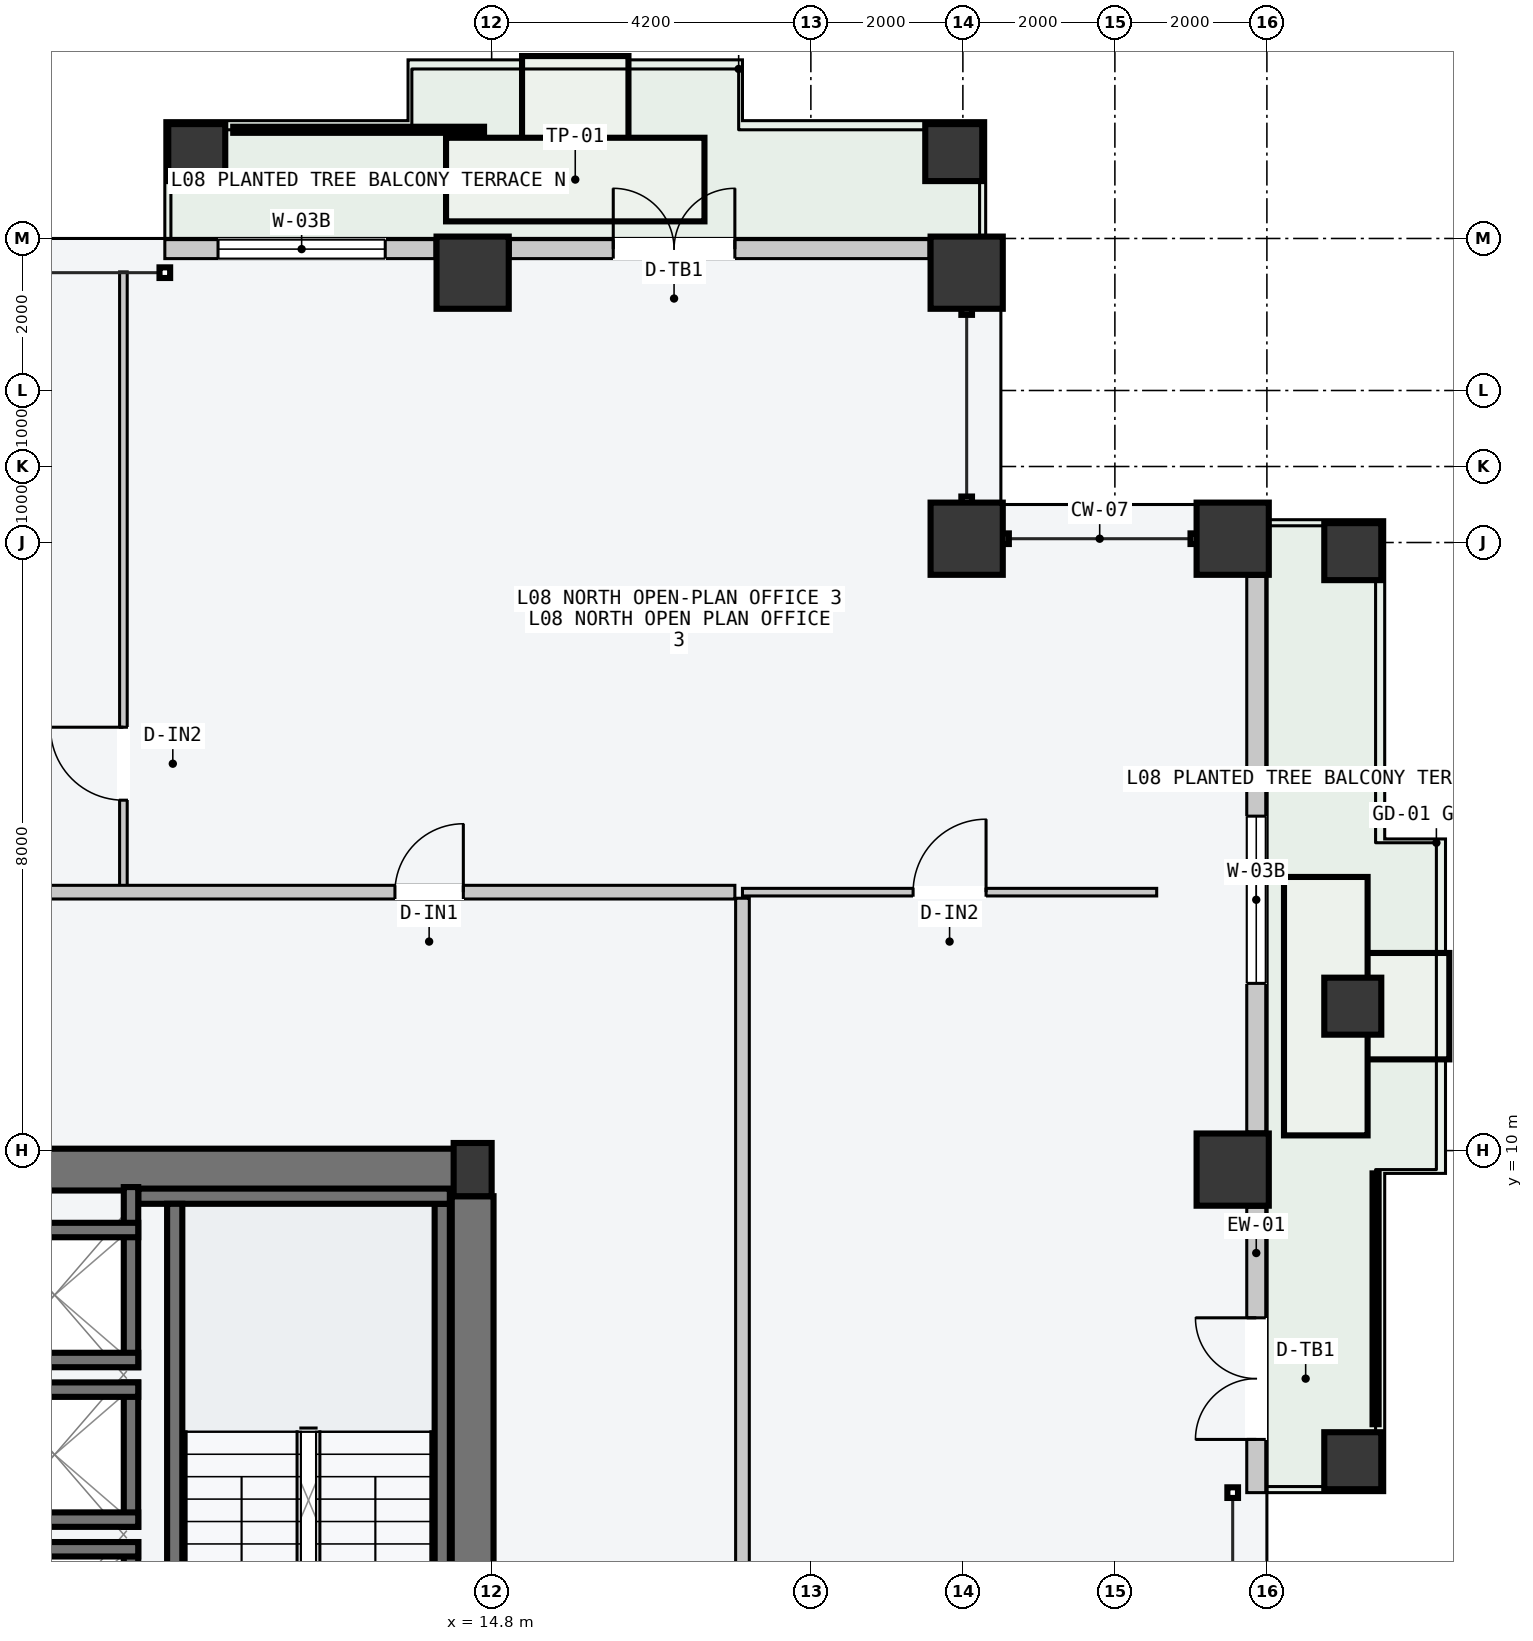
"""IFC4 building model, lengths in metres.
Left out: names, types, materials, properties, quantities, classifications, styles, units other than length and angle.
Written with IfcOpenShell. Run it as: python <this file> out.ifc"""

import sys

from ifc_helpers import new_model, si_unit, direction, frame, frame_2d, origin, origin_2d, place, context, subcontext, project, spatial, rectangle, hollow_rectangle, i_section, extrude, element, fill, save


model = new_model("IFC4")
c1 = context("Model", 3, precision=1e-05, world=origin(), true_north=direction((0.0, 1.0)))
c2 = subcontext(c1, "Body", "Model", "MODEL_VIEW")
j1 = project(units=[si_unit("LENGTHUNIT", "METRE"), si_unit("PLANEANGLEUNIT", "RADIAN")], contexts=[c1])
p1 = place(None, origin())
s1 = spatial("IfcSite", under=j1, at=p1, CompositionType="ELEMENT")
p2 = place(p1, origin())
s2 = spatial("IfcBuilding", under=s1, at=p2, CompositionType="ELEMENT")
p3 = place(p2, frame((0.0, 0.0, 34.8)))
s3 = spatial("IfcBuildingStorey", under=s2, at=p3, CompositionType="ELEMENT", Elevation=34.8)
p4 = place(p3, frame((8.07, 9.75, -0.2), z_axis=(0.0, 0.0, 1.0), x_axis=(1.0, 0.0, 0.0)))
e1 = element("IfcWall", 1, at=p4, inside=s3, PredefinedType="SHEAR", context=c2, shape_type="SweptSolid", body=[
    extrude(rectangle(XDim=6.46, YDim=0.55, at=frame_2d((3.23, 0.0))), origin(), (0.0, 0.0, 1.0), 3.6),
])
p5 = place(p3, frame((14.55, 0.35, -0.2), z_axis=(0.0, 0.0, 1.0), x_axis=(0.0, 1.0, 0.0)))
e2 = element("IfcWall", 2, at=p5, inside=s3, PredefinedType="SHEAR", context=c2, shape_type="SweptSolid", body=[
    extrude(rectangle(XDim=9.05, YDim=0.55, at=frame_2d((4.525, 0.0))), origin(), (0.0, 0.0, 1.0), 3.6),
])
p6 = place(p3, frame((14.15, 1.5, -0.2), z_axis=(0.0, 0.0, 1.0), x_axis=(0.0, 1.0, 0.0)))
e3 = element("IfcWall", 3, at=p6, inside=s3, PredefinedType="SOLIDWALL", context=c2, shape_type="SweptSolid", body=[
    extrude(rectangle(XDim=7.8, YDim=0.2, at=frame_2d((3.9, 0.0))), origin(), (0.0, 0.0, 1.0), 3.6),
])
p7 = place(p3, frame((10.15, 9.4, -0.2), z_axis=(0.0, 0.0, 1.0), x_axis=(1.0, 0.0, 0.0)))
e4 = element("IfcWall", 4, at=p7, inside=s3, PredefinedType="SOLIDWALL", context=c2, shape_type="SweptSolid", body=[
    extrude(rectangle(XDim=4.1, YDim=0.2, at=frame_2d((2.05, 0.0))), origin(), (0.0, 0.0, 1.0), 3.6),
])
p8 = place(p3, frame((10.63, 1.5, -0.2), z_axis=(0.0, 0.0, 1.0), x_axis=(0.0, 1.0, 0.0)))
e5 = element("IfcWall", 5, at=p8, inside=s3, PredefinedType="SOLIDWALL", context=c2, shape_type="SweptSolid", body=[
    extrude(rectangle(XDim=7.8, YDim=0.2, at=frame_2d((3.9, 0.0))), origin(), (0.0, 0.0, 1.0), 3.6),
])
p9 = place(p3, frame((14.55, 9.75, 0.0), z_axis=(0.0, 0.0, 1.0), x_axis=(1.0, 0.0, 0.0)))
e6 = element("IfcColumn", 6, at=p9, inside=s3, PredefinedType="COLUMN", context=c2, shape_type="SweptSolid", body=[
    extrude(i_section(OverallWidth=0.5, OverallDepth=0.7, WebThickness=0.028, FlangeThickness=0.045, at=origin_2d()), origin(), (0.0, 0.0, 1.0), 3.6),
])
for number, where, z_axis, x_axis in (
    (7, (14.55, 21.55, 0.0), (0.0, 0.0, 1.0), (1.0, 0.0, 0.0)),
    (8, (21.05, 21.55, 0.0), (0.0, 0.0, 1.0), (1.0, 0.0, 0.0)),
    (9, (24.55, 9.75, 0.0), (0.0, 0.0, 1.0), (0.0, 1.0, 0.0)),
    (10, (24.55, 18.05, 0.0), (0.0, 0.0, 1.0), (0.0, 1.0, 0.0)),
    (11, (21.05, 18.05, 0.0), (0.0, 0.0, 1.0), (1.0, 0.0, 0.0)),
):
    element("IfcColumn", number, at=place(p3, frame(where, z_axis=z_axis, x_axis=x_axis)), inside=s3, PredefinedType="COLUMN", context=c2, shape_type="SweptSolid", body=[
        extrude(hollow_rectangle(XDim=0.95, YDim=0.95, WallThickness=0.048, at=origin_2d()), origin(), (0.0, 0.0, 1.0), 3.6),
    ])
for number, where, z_axis, x_axis in (
    (12, (10.92, 23.13, 0.0), (0.0, 0.0, 1.0), (1.0, 0.0, 0.0)),
    (13, (20.88, 23.13, 0.0), (0.0, 0.0, 1.0), (1.0, 0.0, 0.0)),
    (14, (26.13, 5.92, 0.0), (0.0, 0.0, 1.0), (0.0, 1.0, 0.0)),
    (15, (26.13, 17.88, 0.0), (0.0, 0.0, 1.0), (0.0, 1.0, 0.0)),
    (16, (26.13, 11.9, 0.0), (0.0, 0.0, 1.0), (0.0, 1.0, 0.0)),
):
    element("IfcColumn", number, at=place(p3, frame(where, z_axis=z_axis, x_axis=x_axis)), inside=s3, PredefinedType="COLUMN", context=c2, shape_type="SweptSolid", body=[
        extrude(hollow_rectangle(XDim=0.75, YDim=0.75, WallThickness=0.032, at=origin_2d()), origin(), (0.0, 0.0, 1.0), 3.6),
    ])
p10 = place(p3, frame((10.5, 21.86, 0.0), z_axis=(0.0, 0.0, 1.0), x_axis=(1.0, 0.0, 0.0)))
e17 = element("IfcWall", 17, at=p10, inside=s3, PredefinedType="STANDARD", context=c2, shape_type="SweptSolid", body=[
    extrude(rectangle(XDim=3.555, YDim=0.25, at=frame_2d((1.777, 0.0))), origin(), (0.0, 0.0, 1.0), 3.4),
])
p11 = place(p10, frame((0.7, 0.0, 0.85)))
e18 = element("IfcOpeningElement", 18, at=p11, cuts=e17, PredefinedType="OPENING", context=c2, shape_type="SweptSolid", body=[
    extrude(rectangle(XDim=2.2, YDim=2.1, at=frame_2d((1.1, 1.05))), frame((0.0, 0.135, 0.0), z_axis=(0.0, -1.0, 0.0), x_axis=(1.0, 0.0, 0.0)), (0.0, 0.0, 1.0), 0.27),
])
p12 = place(p3, frame((15.045, 21.86, 0.0), z_axis=(0.0, 0.0, 1.0), x_axis=(1.0, 0.0, 0.0)))
e19 = element("IfcWall", 19, at=p12, inside=s3, PredefinedType="STANDARD", context=c2, shape_type="SweptSolid", body=[
    extrude(rectangle(XDim=5.51, YDim=0.25, at=frame_2d((2.755, 0.0))), origin(), (0.0, 0.0, 1.0), 3.4),
])
p13 = place(p12, frame((1.355, 0.0, 0.0)))
e20 = element("IfcOpeningElement", 20, at=p13, cuts=e19, PredefinedType="OPENING", context=c2, shape_type="SweptSolid", body=[
    extrude(rectangle(XDim=1.6, YDim=2.2, at=frame_2d((0.8, 1.1))), frame((0.0, 0.135, 0.0), z_axis=(0.0, -1.0, 0.0), x_axis=(1.0, 0.0, 0.0)), (0.0, 0.0, 1.0), 0.27),
])
p14 = place(p3, frame((24.86, 5.5, 0.0), z_axis=(0.0, 0.0, 1.0), x_axis=(0.0, 1.0, 0.0)))
e21 = element("IfcWall", 21, at=p14, inside=s3, PredefinedType="STANDARD", context=c2, shape_type="SweptSolid", body=[
    extrude(rectangle(XDim=3.755, YDim=0.25, at=frame_2d((1.877, 0.0))), origin(), (0.0, 0.0, 1.0), 3.4),
])
p15 = place(p14, frame((0.7, 0.0, 0.0)))
e22 = element("IfcOpeningElement", 22, at=p15, cuts=e21, PredefinedType="OPENING", context=c2, shape_type="SweptSolid", body=[
    extrude(rectangle(XDim=1.6, YDim=2.2, at=frame_2d((0.8, 1.1))), frame((0.0, 0.135, 0.0), z_axis=(0.0, -1.0, 0.0), x_axis=(1.0, 0.0, 0.0)), (0.0, 0.0, 1.0), 0.27),
])
p16 = place(p3, frame((24.86, 10.245, 0.0), z_axis=(0.0, 0.0, 1.0), x_axis=(0.0, 1.0, 0.0)))
e23 = element("IfcWall", 23, at=p16, inside=s3, PredefinedType="STANDARD", context=c2, shape_type="SweptSolid", body=[
    extrude(rectangle(XDim=7.31, YDim=0.25, at=frame_2d((3.655, 0.0))), origin(), (0.0, 0.0, 1.0), 3.4),
])
p17 = place(p16, frame((1.955, 0.0, 0.85)))
e24 = element("IfcOpeningElement", 24, at=p17, cuts=e23, PredefinedType="OPENING", context=c2, shape_type="SweptSolid", body=[
    extrude(rectangle(XDim=2.2, YDim=2.1, at=frame_2d((1.1, 1.05))), frame((0.0, 0.135, 0.0), z_axis=(0.0, -1.0, 0.0), x_axis=(1.0, 0.0, 0.0)), (0.0, 0.0, 1.0), 0.27),
])
p18 = place(p3, frame((10.055, 2.95, -0.2), z_axis=(0.0, 0.0, 1.0), x_axis=(0.0, 1.0, 0.0)))
e25 = element("IfcWall", 25, at=p18, inside=s3, PredefinedType="SOLIDWALL", context=c2, shape_type="SweptSolid", body=[
    extrude(rectangle(XDim=1.9, YDim=0.19, at=frame_2d((0.95, 0.0))), origin(), (0.0, 0.0, 1.0), 3.6),
])
p19 = place(p3, frame((7.95, 4.755, -0.2), z_axis=(0.0, 0.0, 1.0), x_axis=(1.0, 0.0, 0.0)))
e26 = element("IfcWall", 26, at=p19, inside=s3, PredefinedType="SOLIDWALL", context=c2, shape_type="SweptSolid", body=[
    extrude(rectangle(XDim=2.2, YDim=0.19, at=frame_2d((1.1, 0.0))), origin(), (0.0, 0.0, 1.0), 3.6),
])
p20 = place(p3, frame((10.055, 5.05, -0.2), z_axis=(0.0, 0.0, 1.0), x_axis=(0.0, 1.0, 0.0)))
e27 = element("IfcWall", 27, at=p20, inside=s3, PredefinedType="SOLIDWALL", context=c2, shape_type="SweptSolid", body=[
    extrude(rectangle(XDim=1.9, YDim=0.19, at=frame_2d((0.95, 0.0))), origin(), (0.0, 0.0, 1.0), 3.6),
])
for number, where, z_axis, x_axis in (
    (28, (7.95, 6.855, -0.2), (0.0, 0.0, 1.0), (1.0, 0.0, 0.0)),
    (29, (7.95, 5.145, -0.2), (0.0, 0.0, 1.0), (1.0, 0.0, 0.0)),
):
    element("IfcWall", number, at=place(p3, frame(where, z_axis=z_axis, x_axis=x_axis)), inside=s3, PredefinedType="SOLIDWALL", context=c2, shape_type="SweptSolid", body=[
        extrude(rectangle(XDim=2.2, YDim=0.19, at=frame_2d((1.1, 0.0))), origin(), (0.0, 0.0, 1.0), 3.6),
    ])
p21 = place(p3, frame((10.055, 7.15, -0.2), z_axis=(0.0, 0.0, 1.0), x_axis=(0.0, 1.0, 0.0)))
e30 = element("IfcWall", 30, at=p21, inside=s3, PredefinedType="SOLIDWALL", context=c2, shape_type="SweptSolid", body=[
    extrude(rectangle(XDim=2.37, YDim=0.19, at=frame_2d((1.185, 0.0))), origin(), (0.0, 0.0, 1.0), 3.6),
])
for number, where, z_axis, x_axis in (
    (31, (7.95, 8.955, -0.2), (0.0, 0.0, 1.0), (1.0, 0.0, 0.0)),
    (32, (7.95, 7.245, -0.2), (0.0, 0.0, 1.0), (1.0, 0.0, 0.0)),
):
    element("IfcWall", number, at=place(p3, frame(where, z_axis=z_axis, x_axis=x_axis)), inside=s3, PredefinedType="SOLIDWALL", context=c2, shape_type="SweptSolid", body=[
        extrude(rectangle(XDim=2.2, YDim=0.19, at=frame_2d((1.1, 0.0))), origin(), (0.0, 0.0, 1.0), 3.6),
    ])
p22 = place(p3, frame((9.955, 13.46, 0.0), z_axis=(0.0, 0.0, 1.0), x_axis=(0.0, 1.0, 0.0)))
e33 = element("IfcWall", 33, at=p22, inside=s3, PredefinedType="PARTITIONING", context=c2, shape_type="SweptSolid", body=[
    extrude(rectangle(XDim=8.1, YDim=0.1, at=frame_2d((4.05, 0.0))), origin(), (0.0, 0.0, 1.0), 3.4),
])
p23 = place(p22, frame((1.15, 0.0, 0.0)))
e34 = element("IfcOpeningElement", 34, at=p23, cuts=e33, PredefinedType="OPENING", context=c2, shape_type="SweptSolid", body=[
    extrude(rectangle(XDim=0.96, YDim=2.18, at=frame_2d((0.48, 1.09))), frame((0.0, 0.06, 0.0), z_axis=(0.0, -1.0, 0.0), x_axis=(1.0, 0.0, 0.0)), (0.0, 0.0, 1.0), 0.12),
])
p24 = place(p3, frame((-18.0, 13.4, 0.0), z_axis=(0.0, 0.0, 1.0), x_axis=(1.0, 0.0, 0.0)))
e35 = element("IfcWall", 35, at=p24, inside=s3, PredefinedType="PARTITIONING", context=c2, shape_type="SweptSolid", body=[
    extrude(rectangle(XDim=36.0, YDim=0.18, at=frame_2d((18.0, 0.0))), origin(), (0.0, 0.0, 1.0), 3.4),
])
p25 = place(p24, frame((7.185, 0.0, 0.0)))
e36 = element("IfcOpeningElement", 36, at=p25, cuts=e35, PredefinedType="OPENING", context=c2, shape_type="SweptSolid", body=[
    extrude(rectangle(XDim=1.24, YDim=2.24, at=frame_2d((0.62, 1.12))), frame((0.0, 0.1, 0.0), z_axis=(0.0, -1.0, 0.0), x_axis=(1.0, 0.0, 0.0)), (0.0, 0.0, 1.0), 0.2),
])
p26 = place(p24, frame((21.083, 0.0, 0.0)))
e37 = element("IfcOpeningElement", 37, at=p26, cuts=e35, PredefinedType="OPENING", context=c2, shape_type="SweptSolid", body=[
    extrude(rectangle(XDim=1.4, YDim=2.2, at=frame_2d((0.7, 1.1))), frame((0.0, 0.1, 0.0), z_axis=(0.0, -1.0, 0.0), x_axis=(1.0, 0.0, 0.0)), (0.0, 0.0, 1.0), 0.2),
])
p27 = place(p24, frame((31.528, 0.0, 0.0)))
e38 = element("IfcOpeningElement", 38, at=p27, cuts=e35, PredefinedType="OPENING", context=c2, shape_type="SweptSolid", body=[
    extrude(rectangle(XDim=0.9, YDim=2.15, at=frame_2d((0.45, 1.075))), frame((0.0, 0.1, 0.0), z_axis=(0.0, -1.0, 0.0), x_axis=(1.0, 0.0, 0.0)), (0.0, 0.0, 1.0), 0.2),
])
p28 = place(p3, frame((18.1, 13.4, 0.0), z_axis=(0.0, 0.0, 1.0), x_axis=(1.0, 0.0, 0.0)))
e39 = element("IfcWall", 39, at=p28, inside=s3, PredefinedType="PARTITIONING", context=c2, shape_type="SweptSolid", body=[
    extrude(rectangle(XDim=5.45, YDim=0.1, at=frame_2d((2.725, 0.0))), origin(), (0.0, 0.0, 1.0), 3.4),
])
p29 = place(p28, frame((2.245, 0.0, 0.0)))
e40 = element("IfcOpeningElement", 40, at=p29, cuts=e39, PredefinedType="OPENING", context=c2, shape_type="SweptSolid", body=[
    extrude(rectangle(XDim=0.96, YDim=2.18, at=frame_2d((0.48, 1.09))), frame((0.0, 0.06, 0.0), z_axis=(0.0, -1.0, 0.0), x_axis=(1.0, 0.0, 0.0)), (0.0, 0.0, 1.0), 0.12),
])
p30 = place(p3, frame((18.1, -13.32, 0.0), z_axis=(0.0, 0.0, 1.0), x_axis=(0.0, 1.0, 0.0)))
e41 = element("IfcWall", 41, at=p30, inside=s3, PredefinedType="PARTITIONING", context=c2, shape_type="SweptSolid", body=[
    extrude(rectangle(XDim=26.64, YDim=0.18, at=frame_2d((13.32, 0.0))), origin(), (0.0, 0.0, 1.0), 3.4),
])
p31 = place(p30, frame((12.62, 0.0, 0.0)))
e42 = element("IfcOpeningElement", 42, at=p31, cuts=e41, PredefinedType="OPENING", context=c2, shape_type="SweptSolid", body=[
    extrude(rectangle(XDim=1.4, YDim=2.2, at=frame_2d((0.7, 1.1))), frame((0.0, 0.1, 0.0), z_axis=(0.0, -1.0, 0.0), x_axis=(1.0, 0.0, 0.0)), (0.0, 0.0, 1.0), 0.2),
])
p32 = place(p11, origin())
e43 = element("IfcWindow", 43, at=p32, inside=s3, PartitioningType="SINGLE_PANEL", PredefinedType="WINDOW", context=c2, shape_type="SweptSolid", body=[
    extrude(rectangle(XDim=2.2, YDim=2.1, at=frame_2d((1.1, 1.05))), frame((0.0, 0.03, 0.0), z_axis=(0.0, -1.0, 0.0), x_axis=(1.0, 0.0, 0.0)), (0.0, 0.0, 1.0), 0.06),
])
fill(e18, e43)
p33 = place(p13, origin())
e44 = element("IfcDoor", 44, at=p33, inside=s3, OperationType="DOUBLE_DOOR_SINGLE_SWING", PredefinedType="DOOR", context=c2, shape_type="SweptSolid", body=[
    extrude(rectangle(XDim=1.6, YDim=2.2, at=frame_2d((0.8, 1.1))), frame((0.0, 0.025, 0.0), z_axis=(0.0, -1.0, 0.0), x_axis=(1.0, 0.0, 0.0)), (0.0, 0.0, 1.0), 0.05),
])
fill(e20, e44)
p34 = place(p15, origin())
e45 = element("IfcDoor", 45, at=p34, inside=s3, OperationType="DOUBLE_DOOR_SINGLE_SWING", PredefinedType="DOOR", context=c2, shape_type="SweptSolid", body=[
    extrude(rectangle(XDim=1.6, YDim=2.2, at=frame_2d((0.8, 1.1))), frame((0.0, 0.025, 0.0), z_axis=(0.0, -1.0, 0.0), x_axis=(1.0, 0.0, 0.0)), (0.0, 0.0, 1.0), 0.05),
])
fill(e22, e45)
p35 = place(p17, origin())
e46 = element("IfcWindow", 46, at=p35, inside=s3, PartitioningType="SINGLE_PANEL", PredefinedType="WINDOW", context=c2, shape_type="SweptSolid", body=[
    extrude(rectangle(XDim=2.2, YDim=2.1, at=frame_2d((1.1, 1.05))), frame((0.0, 0.03, 0.0), z_axis=(0.0, -1.0, 0.0), x_axis=(1.0, 0.0, 0.0)), (0.0, 0.0, 1.0), 0.06),
])
fill(e24, e46)
p36 = place(p23, origin())
e47 = element("IfcDoor", 47, at=p36, inside=s3, OperationType="SINGLE_SWING_RIGHT", PredefinedType="DOOR", context=c2, shape_type="SweptSolid", body=[
    extrude(rectangle(XDim=0.96, YDim=2.18, at=frame_2d((0.48, 1.09))), frame((0.0, 0.025, 0.0), z_axis=(0.0, -1.0, 0.0), x_axis=(1.0, 0.0, 0.0)), (0.0, 0.0, 1.0), 0.05),
])
fill(e34, e47)
p37 = place(p27, origin())
e48 = element("IfcDoor", 48, at=p37, inside=s3, OperationType="SINGLE_SWING_RIGHT", PredefinedType="DOOR", context=c2, shape_type="SweptSolid", body=[
    extrude(rectangle(XDim=0.9, YDim=2.15, at=frame_2d((0.45, 1.075))), frame((0.0, 0.025, 0.0), z_axis=(0.0, -1.0, 0.0), x_axis=(1.0, 0.0, 0.0)), (0.0, 0.0, 1.0), 0.05),
])
fill(e38, e48)
p38 = place(p29, origin())
e49 = element("IfcDoor", 49, at=p38, inside=s3, OperationType="SINGLE_SWING_RIGHT", PredefinedType="DOOR", context=c2, shape_type="SweptSolid", body=[
    extrude(rectangle(XDim=0.96, YDim=2.18, at=frame_2d((0.48, 1.09))), frame((0.0, 0.025, 0.0), z_axis=(0.0, -1.0, 0.0), x_axis=(1.0, 0.0, 0.0)), (0.0, 0.0, 1.0), 0.05),
])
fill(e40, e49)
save(model, sys.argv[1])
